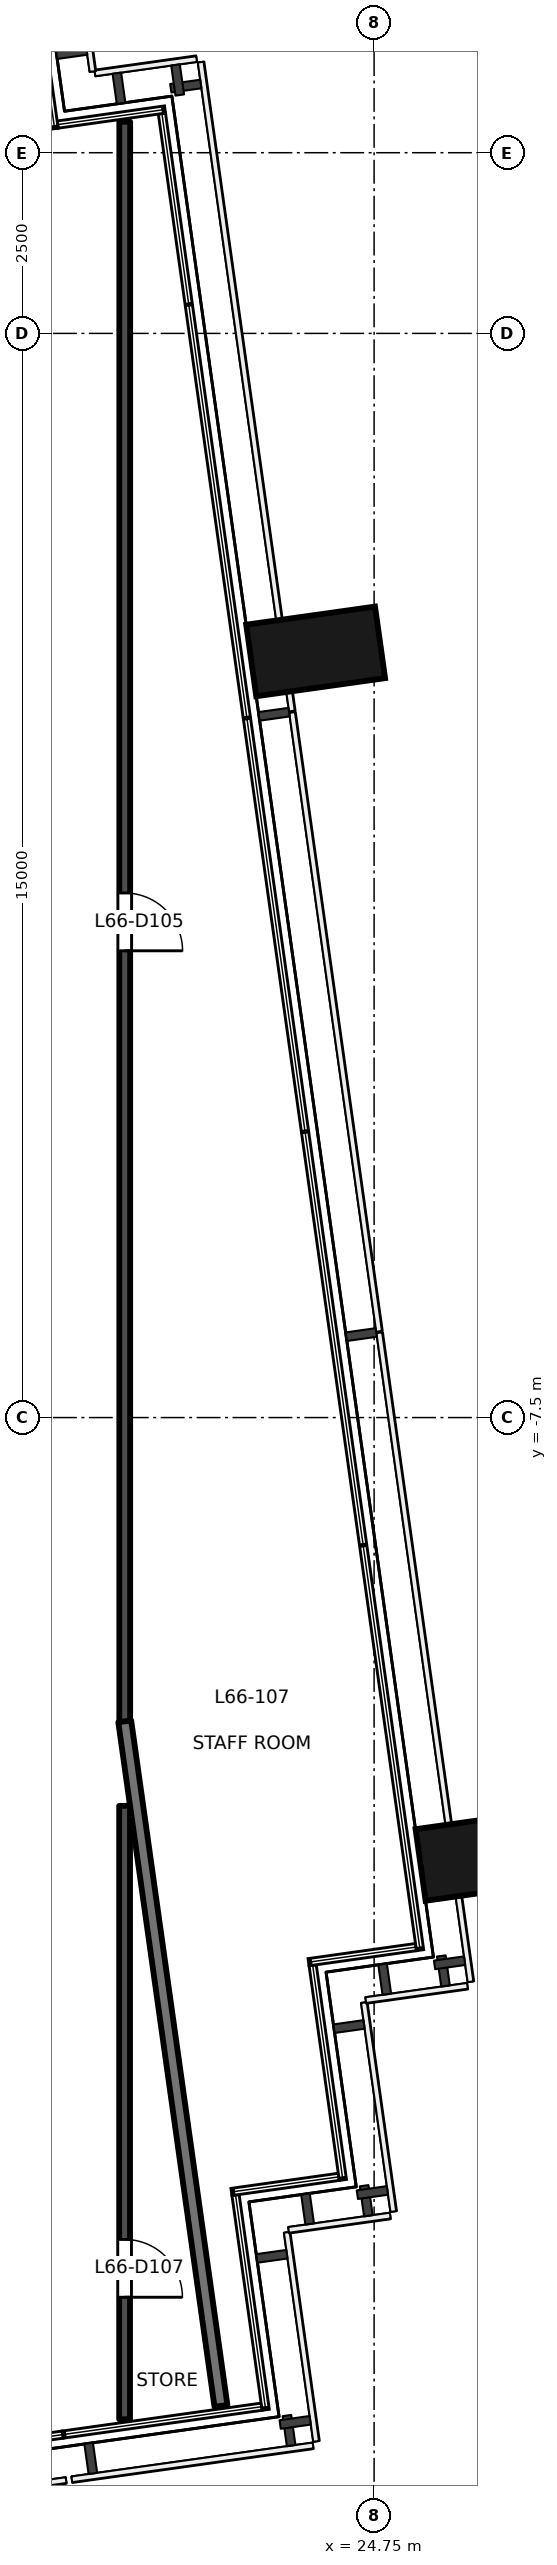
"""IFC4 building model, lengths in metres.
Left out: names, types, materials, properties, quantities, classifications, styles, units other than length and angle.
Written with IfcOpenShell. Run it as: python <this file> out.ifc"""

import sys

from ifc_helpers import new_model, si_unit, direction, frame, frame_2d, origin, origin_2d, place, context, subcontext, project, spatial, rectangle, extrude, element, fill, save


model = new_model("IFC4")
c1 = context("Model", 3, precision=1e-05, world=origin(), true_north=direction((0.0, 1.0)))
c2 = subcontext(c1, "Body", "Model", "MODEL_VIEW")
j1 = project(units=[si_unit("LENGTHUNIT", "METRE"), si_unit("PLANEANGLEUNIT", "RADIAN")], contexts=[c1])
p1 = place(None, origin())
s1 = spatial("IfcSite", under=j1, at=p1, CompositionType="ELEMENT")
p2 = place(p1, origin())
s2 = spatial("IfcBuilding", under=s1, at=p2, CompositionType="ELEMENT")
p3 = place(p2, frame((0.0, 0.0, 286.3)))
s3 = spatial("IfcBuildingStorey", under=s2, at=p3, CompositionType="ELEMENT", Elevation=286.3)
for number, where, z_axis, x_axis in (
    (1, (26.284, -13.565, -0.2), (0.0, 0.0, 1.0), (-0.139, 0.99, 0.0)),
    (2, (23.941, 3.1, -0.2), (0.0, 0.0, 1.0), (-0.139, 0.99, 0.0)),
):
    element("IfcColumn", number, at=place(p3, frame(where, z_axis=z_axis, x_axis=x_axis)), inside=s3, PredefinedType="COLUMN", context=c2, shape_type="SweptSolid", body=[
        extrude(rectangle(XDim=1.0, YDim=1.8, at=origin_2d()), origin(), (0.0, 0.0, 1.0), 6.0),
    ])
p4 = place(p3, frame((21.3, 10.428, 0.0), z_axis=(0.0, 0.0, 1.0), x_axis=(0.0, -1.0, 0.0)))
e3 = element("IfcWall", 3, at=p4, inside=s3, PredefinedType="PARTITIONING", context=c2, shape_type="SweptSolid", body=[
    extrude(rectangle(XDim=22.141, YDim=0.15, at=frame_2d((11.07, 0.0))), origin(), (0.0, 0.0, 1.0), 3.75),
])
p5 = place(p4, frame((10.67, 0.0, 0.0)))
e4 = element("IfcOpeningElement", 4, at=p5, cuts=e3, PredefinedType="OPENING", context=c2, shape_type="SweptSolid", body=[
    extrude(rectangle(XDim=0.8, YDim=2.1, at=frame_2d((0.4, 1.05))), frame((0.0, 0.085, 0.0), z_axis=(0.0, -1.0, 0.0), x_axis=(1.0, 0.0, 0.0)), (0.0, 0.0, 1.0), 0.171),
])
p6 = place(p3, frame((21.298, -12.872, 0.0), z_axis=(0.0, 0.0, 1.0), x_axis=(0.0, -1.0, 0.0)))
e5 = element("IfcWall", 5, at=p6, inside=s3, PredefinedType="PARTITIONING", context=c2, shape_type="SweptSolid", body=[
    extrude(rectangle(XDim=8.487, YDim=0.15, at=frame_2d((4.243, 0.0))), origin(), (0.0, 0.0, 1.0), 5.8),
])
p7 = place(p6, frame((5.999, 0.0, 0.0)))
e6 = element("IfcOpeningElement", 6, at=p7, cuts=e5, PredefinedType="OPENING", context=c2, shape_type="SweptSolid", body=[
    extrude(rectangle(XDim=0.8, YDim=2.1, at=frame_2d((0.4, 1.05))), frame((0.0, 0.085, 0.0), z_axis=(0.0, -1.0, 0.0), x_axis=(1.0, 0.0, 0.0)), (0.0, 0.0, 1.0), 0.171),
])
p8 = place(p3, frame((22.631, -21.174, 0.0), z_axis=(0.0, 0.0, 1.0), x_axis=(-0.139169567919, 0.990268565272, 0.0)))
e7 = element("IfcWall", 7, at=p8, inside=s3, PredefinedType="PARTITIONING", context=c2, shape_type="SweptSolid", body=[
    extrude(rectangle(XDim=9.564, YDim=0.18, at=frame_2d((4.782, 0.0))), origin(), (0.0, 0.0, 1.0), 5.8),
])
p9 = place(p5, origin())
e8 = element("IfcDoor", 8, at=p9, inside=s3, OperationType="SINGLE_SWING_RIGHT", PredefinedType="DOOR", context=c2, shape_type="SweptSolid", body=[
    extrude(rectangle(XDim=0.8, YDim=2.1, at=frame_2d((0.4, 1.05))), frame((0.0, 0.025, 0.0), z_axis=(0.0, -1.0, 0.0), x_axis=(1.0, 0.0, 0.0)), (0.0, 0.0, 1.0), 0.05),
])
fill(e4, e8)
p10 = place(p7, origin())
e9 = element("IfcDoor", 9, at=p10, inside=s3, OperationType="SINGLE_SWING_RIGHT", PredefinedType="DOOR", context=c2, shape_type="SweptSolid", body=[
    extrude(rectangle(XDim=0.8, YDim=2.1, at=frame_2d((0.4, 1.05))), frame((0.0, 0.025, 0.0), z_axis=(0.0, -1.0, 0.0), x_axis=(1.0, 0.0, 0.0)), (0.0, 0.0, 1.0), 0.05),
])
fill(e6, e9)
save(model, sys.argv[1])
